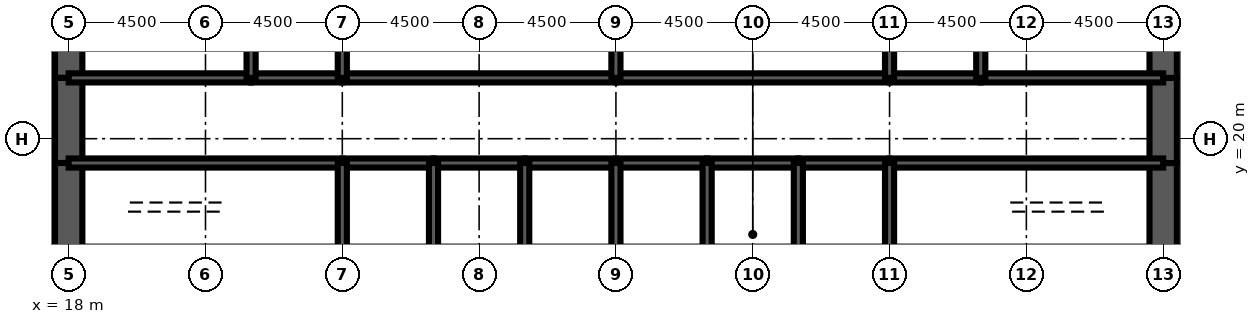
"""IFC4 building model, lengths in metres.
Left out: names, types, materials, properties, quantities, classifications, styles, units other than length and angle.
Written with IfcOpenShell. Run it as: python <this file> out.ifc"""

import sys

from ifc_helpers import new_model, si_unit, direction, frame, frame_2d, origin, place, context, subcontext, project, spatial, rectangle, extrude, element, fill, save


model = new_model("IFC4")
c1 = context("Model", 3, precision=1e-05, world=origin(), true_north=direction((0.0, 1.0)))
c2 = subcontext(c1, "Body", "Model", "MODEL_VIEW")
j1 = project(units=[si_unit("LENGTHUNIT", "METRE"), si_unit("PLANEANGLEUNIT", "RADIAN")], contexts=[c1])
p1 = place(None, origin())
s1 = spatial("IfcSite", under=j1, at=p1, CompositionType="ELEMENT")
p2 = place(p1, origin())
s2 = spatial("IfcBuilding", under=s1, at=p2, CompositionType="ELEMENT")
p3 = place(p2, frame((0.0, 0.0, 142.5)))
s3 = spatial("IfcBuildingStorey", under=s2, at=p3, CompositionType="ELEMENT", Elevation=142.5)
p4 = place(p3, frame((18.0, 26.0, 0.0), z_axis=(0.0, 0.0, 1.0), x_axis=(0.0, -1.0, 0.0)))
e1 = element("IfcWall", 1, at=p4, inside=s3, PredefinedType="SHEAR", context=c2, shape_type="SweptSolid", body=[
    extrude(rectangle(XDim=4.0, YDim=0.9, at=frame_2d((2.0, 0.0))), origin(), (0.0, 0.0, 1.0), 4.2),
])
p5 = place(p3, frame((18.0, 22.0, 0.0), z_axis=(0.0, 0.0, 1.0), x_axis=(0.0, -1.0, 0.0)))
e2 = element("IfcWall", 2, at=p5, inside=s3, PredefinedType="SHEAR", context=c2, shape_type="SweptSolid", body=[
    extrude(rectangle(XDim=2.8, YDim=0.9, at=frame_2d((1.4, 0.0))), origin(), (0.0, 0.0, 1.0), 4.2),
])
p6 = place(p5, frame((0.6, 0.0, 0.0)))
e3 = element("IfcOpeningElement", 3, at=p6, cuts=e2, PredefinedType="OPENING", context=c2, shape_type="SweptSolid", body=[
    extrude(rectangle(XDim=1.8, YDim=2.1, at=frame_2d((0.9, 1.05))), frame((0.0, 0.46, 0.0), z_axis=(0.0, -1.0, 0.0), x_axis=(1.0, 0.0, 0.0)), (0.0, 0.0, 1.0), 0.92),
])
for number, where, z_axis, x_axis in (
    (4, (18.0, 19.2, 0.0), (0.0, 0.0, 1.0), (0.0, -1.0, 0.0)),
    (5, (54.0, 16.0, 0.0), (0.0, 0.0, 1.0), (0.0, 1.0, 0.0)),
):
    element("IfcWall", number, at=place(p3, frame(where, z_axis=z_axis, x_axis=x_axis)), inside=s3, PredefinedType="SHEAR", context=c2, shape_type="SweptSolid", body=[
        extrude(rectangle(XDim=3.2, YDim=0.9, at=frame_2d((1.6, 0.0))), origin(), (0.0, 0.0, 1.0), 4.2),
    ])
p7 = place(p3, frame((54.0, 19.2, 0.0), z_axis=(0.0, 0.0, 1.0), x_axis=(0.0, 1.0, 0.0)))
e6 = element("IfcWall", 6, at=p7, inside=s3, PredefinedType="SHEAR", context=c2, shape_type="SweptSolid", body=[
    extrude(rectangle(XDim=2.8, YDim=0.9, at=frame_2d((1.4, 0.0))), origin(), (0.0, 0.0, 1.0), 4.2),
])
p8 = place(p7, frame((0.4, 0.0, 0.0)))
e7 = element("IfcOpeningElement", 7, at=p8, cuts=e6, PredefinedType="OPENING", context=c2, shape_type="SweptSolid", body=[
    extrude(rectangle(XDim=1.8, YDim=2.1, at=frame_2d((0.9, 1.05))), frame((0.0, 0.46, 0.0), z_axis=(0.0, -1.0, 0.0), x_axis=(1.0, 0.0, 0.0)), (0.0, 0.0, 1.0), 0.92),
])
p9 = place(p3, frame((54.0, 22.0, 0.0), z_axis=(0.0, 0.0, 1.0), x_axis=(0.0, 1.0, 0.0)))
e8 = element("IfcWall", 8, at=p9, inside=s3, PredefinedType="SHEAR", context=c2, shape_type="SweptSolid", body=[
    extrude(rectangle(XDim=4.0, YDim=0.9, at=frame_2d((2.0, 0.0))), origin(), (0.0, 0.0, 1.0), 4.2),
])
p10 = place(p3, frame((18.0, 19.2, 0.0), z_axis=(0.0, 0.0, 1.0), x_axis=(1.0, 0.0, 0.0)))
e9 = element("IfcWall", 9, at=p10, inside=s3, PredefinedType="SOLIDWALL", context=c2, shape_type="SweptSolid", body=[
    extrude(rectangle(XDim=9.0, YDim=0.3, at=frame_2d((4.5, 0.0))), origin(), (0.0, 0.0, 1.0), 4.2),
])
p11 = place(p10, frame((0.65, 0.0, 0.0)))
e10 = element("IfcOpeningElement", 10, at=p11, cuts=e9, PredefinedType="OPENING", context=c2, shape_type="SweptSolid", body=[
    extrude(rectangle(XDim=1.0, YDim=2.1, at=frame_2d((0.5, 1.05))), frame((0.0, 0.16, 0.0), z_axis=(0.0, -1.0, 0.0), x_axis=(1.0, 0.0, 0.0)), (0.0, 0.0, 1.0), 0.32),
])
p12 = place(p3, frame((27.0, 19.2, 0.0), z_axis=(0.0, 0.0, 1.0), x_axis=(1.0, 0.0, 0.0)))
e11 = element("IfcWall", 11, at=p12, inside=s3, PredefinedType="SOLIDWALL", context=c2, shape_type="SweptSolid", body=[
    extrude(rectangle(XDim=3.0, YDim=0.3, at=frame_2d((1.5, 0.0))), origin(), (0.0, 0.0, 1.0), 4.2),
])
p13 = place(p12, frame((0.95, 0.0, 0.0)))
e12 = element("IfcOpeningElement", 12, at=p13, cuts=e11, PredefinedType="OPENING", context=c2, shape_type="SweptSolid", body=[
    extrude(rectangle(XDim=1.1, YDim=2.2, at=frame_2d((0.55, 1.1))), frame((0.0, 0.16, 0.0), z_axis=(0.0, -1.0, 0.0), x_axis=(1.0, 0.0, 0.0)), (0.0, 0.0, 1.0), 0.32),
])
p14 = place(p3, frame((30.0, 19.2, 0.0), z_axis=(0.0, 0.0, 1.0), x_axis=(1.0, 0.0, 0.0)))
e13 = element("IfcWall", 13, at=p14, inside=s3, PredefinedType="SOLIDWALL", context=c2, shape_type="SweptSolid", body=[
    extrude(rectangle(XDim=3.0, YDim=0.3, at=frame_2d((1.5, 0.0))), origin(), (0.0, 0.0, 1.0), 4.2),
])
p15 = place(p14, frame((0.95, 0.0, 0.0)))
e14 = element("IfcOpeningElement", 14, at=p15, cuts=e13, PredefinedType="OPENING", context=c2, shape_type="SweptSolid", body=[
    extrude(rectangle(XDim=1.1, YDim=2.2, at=frame_2d((0.55, 1.1))), frame((0.0, 0.16, 0.0), z_axis=(0.0, -1.0, 0.0), x_axis=(1.0, 0.0, 0.0)), (0.0, 0.0, 1.0), 0.32),
])
p16 = place(p3, frame((33.0, 19.2, 0.0), z_axis=(0.0, 0.0, 1.0), x_axis=(1.0, 0.0, 0.0)))
e15 = element("IfcWall", 15, at=p16, inside=s3, PredefinedType="SOLIDWALL", context=c2, shape_type="SweptSolid", body=[
    extrude(rectangle(XDim=3.0, YDim=0.3, at=frame_2d((1.5, 0.0))), origin(), (0.0, 0.0, 1.0), 4.2),
])
p17 = place(p16, frame((0.95, 0.0, 0.0)))
e16 = element("IfcOpeningElement", 16, at=p17, cuts=e15, PredefinedType="OPENING", context=c2, shape_type="SweptSolid", body=[
    extrude(rectangle(XDim=1.1, YDim=2.2, at=frame_2d((0.55, 1.1))), frame((0.0, 0.16, 0.0), z_axis=(0.0, -1.0, 0.0), x_axis=(1.0, 0.0, 0.0)), (0.0, 0.0, 1.0), 0.32),
])
p18 = place(p3, frame((36.0, 19.2, 0.0), z_axis=(0.0, 0.0, 1.0), x_axis=(1.0, 0.0, 0.0)))
e17 = element("IfcWall", 17, at=p18, inside=s3, PredefinedType="SOLIDWALL", context=c2, shape_type="SweptSolid", body=[
    extrude(rectangle(XDim=3.0, YDim=0.3, at=frame_2d((1.5, 0.0))), origin(), (0.0, 0.0, 1.0), 4.2),
])
p19 = place(p18, frame((0.95, 0.0, 0.0)))
e18 = element("IfcOpeningElement", 18, at=p19, cuts=e17, PredefinedType="OPENING", context=c2, shape_type="SweptSolid", body=[
    extrude(rectangle(XDim=1.1, YDim=2.2, at=frame_2d((0.55, 1.1))), frame((0.0, 0.16, 0.0), z_axis=(0.0, -1.0, 0.0), x_axis=(1.0, 0.0, 0.0)), (0.0, 0.0, 1.0), 0.32),
])
p20 = place(p3, frame((39.0, 19.2, 0.0), z_axis=(0.0, 0.0, 1.0), x_axis=(1.0, 0.0, 0.0)))
e19 = element("IfcWall", 19, at=p20, inside=s3, PredefinedType="SOLIDWALL", context=c2, shape_type="SweptSolid", body=[
    extrude(rectangle(XDim=3.0, YDim=0.3, at=frame_2d((1.5, 0.0))), origin(), (0.0, 0.0, 1.0), 4.2),
])
p21 = place(p20, frame((1.0, 0.0, 0.0)))
e20 = element("IfcOpeningElement", 20, at=p21, cuts=e19, PredefinedType="OPENING", context=c2, shape_type="SweptSolid", body=[
    extrude(rectangle(XDim=1.0, YDim=2.1, at=frame_2d((0.5, 1.05))), frame((0.0, 0.16, 0.0), z_axis=(0.0, -1.0, 0.0), x_axis=(1.0, 0.0, 0.0)), (0.0, 0.0, 1.0), 0.32),
])
p22 = place(p3, frame((42.0, 19.2, 0.0), z_axis=(0.0, 0.0, 1.0), x_axis=(1.0, 0.0, 0.0)))
e21 = element("IfcWall", 21, at=p22, inside=s3, PredefinedType="SOLIDWALL", context=c2, shape_type="SweptSolid", body=[
    extrude(rectangle(XDim=3.0, YDim=0.3, at=frame_2d((1.5, 0.0))), origin(), (0.0, 0.0, 1.0), 4.2),
])
p23 = place(p3, frame((45.0, 19.2, 0.0), z_axis=(0.0, 0.0, 1.0), x_axis=(1.0, 0.0, 0.0)))
e22 = element("IfcWall", 22, at=p23, inside=s3, PredefinedType="SOLIDWALL", context=c2, shape_type="SweptSolid", body=[
    extrude(rectangle(XDim=9.0, YDim=0.3, at=frame_2d((4.5, 0.0))), origin(), (0.0, 0.0, 1.0), 4.2),
])
p24 = place(p23, frame((7.35, 0.0, 0.0)))
e23 = element("IfcOpeningElement", 23, at=p24, cuts=e22, PredefinedType="OPENING", context=c2, shape_type="SweptSolid", body=[
    extrude(rectangle(XDim=1.0, YDim=2.1, at=frame_2d((0.5, 1.05))), frame((0.0, 0.16, 0.0), z_axis=(0.0, -1.0, 0.0), x_axis=(1.0, 0.0, 0.0)), (0.0, 0.0, 1.0), 0.32),
])
p25 = place(p3, frame((18.0, 22.0, 0.0), z_axis=(0.0, 0.0, 1.0), x_axis=(1.0, 0.0, 0.0)))
e24 = element("IfcWall", 24, at=p25, inside=s3, PredefinedType="SOLIDWALL", context=c2, shape_type="SweptSolid", body=[
    extrude(rectangle(XDim=6.0, YDim=0.3, at=frame_2d((3.0, 0.0))), origin(), (0.0, 0.0, 1.0), 4.2),
])
p26 = place(p25, frame((2.0, 0.0, 0.0)))
e25 = element("IfcOpeningElement", 25, at=p26, cuts=e24, PredefinedType="OPENING", context=c2, shape_type="SweptSolid", body=[
    extrude(rectangle(XDim=1.0, YDim=2.1, at=frame_2d((0.5, 1.05))), frame((0.0, 0.16, 0.0), z_axis=(0.0, -1.0, 0.0), x_axis=(1.0, 0.0, 0.0)), (0.0, 0.0, 1.0), 0.32),
])
p27 = place(p3, frame((24.0, 22.0, 0.0), z_axis=(0.0, 0.0, 1.0), x_axis=(1.0, 0.0, 0.0)))
e26 = element("IfcWall", 26, at=p27, inside=s3, PredefinedType="SOLIDWALL", context=c2, shape_type="SweptSolid", body=[
    extrude(rectangle(XDim=3.0, YDim=0.3, at=frame_2d((1.5, 0.0))), origin(), (0.0, 0.0, 1.0), 4.2),
])
p28 = place(p27, frame((1.0, 0.0, 0.0)))
e27 = element("IfcOpeningElement", 27, at=p28, cuts=e26, PredefinedType="OPENING", context=c2, shape_type="SweptSolid", body=[
    extrude(rectangle(XDim=1.0, YDim=2.1, at=frame_2d((0.5, 1.05))), frame((0.0, 0.16, 0.0), z_axis=(0.0, -1.0, 0.0), x_axis=(1.0, 0.0, 0.0)), (0.0, 0.0, 1.0), 0.32),
])
p29 = place(p3, frame((27.0, 22.0, 0.0), z_axis=(0.0, 0.0, 1.0), x_axis=(1.0, 0.0, 0.0)))
e28 = element("IfcWall", 28, at=p29, inside=s3, PredefinedType="SOLIDWALL", context=c2, shape_type="SweptSolid", body=[
    extrude(rectangle(XDim=9.0, YDim=0.3, at=frame_2d((4.5, 0.0))), origin(), (0.0, 0.0, 1.0), 4.2),
])
p30 = place(p29, frame((4.0, 0.0, 0.0)))
e29 = element("IfcOpeningElement", 29, at=p30, cuts=e28, PredefinedType="OPENING", context=c2, shape_type="SweptSolid", body=[
    extrude(rectangle(XDim=1.0, YDim=2.1, at=frame_2d((0.5, 1.05))), frame((0.0, 0.16, 0.0), z_axis=(0.0, -1.0, 0.0), x_axis=(1.0, 0.0, 0.0)), (0.0, 0.0, 1.0), 0.32),
])
p31 = place(p3, frame((36.0, 22.0, 0.0), z_axis=(0.0, 0.0, 1.0), x_axis=(1.0, 0.0, 0.0)))
e30 = element("IfcWall", 30, at=p31, inside=s3, PredefinedType="SOLIDWALL", context=c2, shape_type="SweptSolid", body=[
    extrude(rectangle(XDim=9.0, YDim=0.3, at=frame_2d((4.5, 0.0))), origin(), (0.0, 0.0, 1.0), 4.2),
])
p32 = place(p31, frame((4.0, 0.0, 0.0)))
e31 = element("IfcOpeningElement", 31, at=p32, cuts=e30, PredefinedType="OPENING", context=c2, shape_type="SweptSolid", body=[
    extrude(rectangle(XDim=1.0, YDim=2.1, at=frame_2d((0.5, 1.05))), frame((0.0, 0.16, 0.0), z_axis=(0.0, -1.0, 0.0), x_axis=(1.0, 0.0, 0.0)), (0.0, 0.0, 1.0), 0.32),
])
p33 = place(p3, frame((45.0, 22.0, 0.0), z_axis=(0.0, 0.0, 1.0), x_axis=(1.0, 0.0, 0.0)))
e32 = element("IfcWall", 32, at=p33, inside=s3, PredefinedType="SOLIDWALL", context=c2, shape_type="SweptSolid", body=[
    extrude(rectangle(XDim=3.0, YDim=0.3, at=frame_2d((1.5, 0.0))), origin(), (0.0, 0.0, 1.0), 4.2),
])
p34 = place(p33, frame((1.0, 0.0, 0.0)))
e33 = element("IfcOpeningElement", 33, at=p34, cuts=e32, PredefinedType="OPENING", context=c2, shape_type="SweptSolid", body=[
    extrude(rectangle(XDim=1.0, YDim=2.1, at=frame_2d((0.5, 1.05))), frame((0.0, 0.16, 0.0), z_axis=(0.0, -1.0, 0.0), x_axis=(1.0, 0.0, 0.0)), (0.0, 0.0, 1.0), 0.32),
])
p35 = place(p3, frame((48.0, 22.0, 0.0), z_axis=(0.0, 0.0, 1.0), x_axis=(1.0, 0.0, 0.0)))
e34 = element("IfcWall", 34, at=p35, inside=s3, PredefinedType="SOLIDWALL", context=c2, shape_type="SweptSolid", body=[
    extrude(rectangle(XDim=6.0, YDim=0.3, at=frame_2d((3.0, 0.0))), origin(), (0.0, 0.0, 1.0), 4.2),
])
p36 = place(p35, frame((2.0, 0.0, 0.0)))
e35 = element("IfcOpeningElement", 35, at=p36, cuts=e34, PredefinedType="OPENING", context=c2, shape_type="SweptSolid", body=[
    extrude(rectangle(XDim=1.0, YDim=2.1, at=frame_2d((0.5, 1.05))), frame((0.0, 0.16, 0.0), z_axis=(0.0, -1.0, 0.0), x_axis=(1.0, 0.0, 0.0)), (0.0, 0.0, 1.0), 0.32),
])
p37 = place(p35, frame((4.3, 0.0, 0.0)))
e36 = element("IfcOpeningElement", 36, at=p37, cuts=e34, PredefinedType="OPENING", context=c2, shape_type="SweptSolid", body=[
    extrude(rectangle(XDim=1.0, YDim=2.1, at=frame_2d((0.5, 1.05))), frame((0.0, 0.16, 0.0), z_axis=(0.0, -1.0, 0.0), x_axis=(1.0, 0.0, 0.0)), (0.0, 0.0, 1.0), 0.32),
])
for number, where, z_axis, x_axis in (
    (37, (27.0, 16.0, 0.0), (0.0, 0.0, 1.0), (0.0, 1.0, 0.0)),
    (38, (30.0, 16.0, 0.0), (0.0, 0.0, 1.0), (0.0, 1.0, 0.0)),
    (39, (33.0, 16.0, 0.0), (0.0, 0.0, 1.0), (0.0, 1.0, 0.0)),
    (40, (36.0, 16.0, 0.0), (0.0, 0.0, 1.0), (0.0, 1.0, 0.0)),
    (41, (39.0, 16.0, 0.0), (0.0, 0.0, 1.0), (0.0, 1.0, 0.0)),
    (42, (42.0, 16.0, 0.0), (0.0, 0.0, 1.0), (0.0, 1.0, 0.0)),
    (43, (45.0, 16.0, 0.0), (0.0, 0.0, 1.0), (0.0, 1.0, 0.0)),
):
    element("IfcWall", number, at=place(p3, frame(where, z_axis=z_axis, x_axis=x_axis)), inside=s3, PredefinedType="SOLIDWALL", context=c2, shape_type="SweptSolid", body=[
        extrude(rectangle(XDim=3.2, YDim=0.3, at=frame_2d((1.6, 0.0))), origin(), (0.0, 0.0, 1.0), 4.2),
    ])
for number, where, z_axis, x_axis in (
    (44, (24.0, 22.0, 0.0), (0.0, 0.0, 1.0), (0.0, 1.0, 0.0)),
    (45, (27.0, 22.0, 0.0), (0.0, 0.0, 1.0), (0.0, 1.0, 0.0)),
    (46, (36.0, 22.0, 0.0), (0.0, 0.0, 1.0), (0.0, 1.0, 0.0)),
    (47, (45.0, 22.0, 0.0), (0.0, 0.0, 1.0), (0.0, 1.0, 0.0)),
    (48, (48.0, 22.0, 0.0), (0.0, 0.0, 1.0), (0.0, 1.0, 0.0)),
):
    element("IfcWall", number, at=place(p3, frame(where, z_axis=z_axis, x_axis=x_axis)), inside=s3, PredefinedType="SOLIDWALL", context=c2, shape_type="SweptSolid", body=[
        extrude(rectangle(XDim=4.0, YDim=0.3, at=frame_2d((2.0, 0.0))), origin(), (0.0, 0.0, 1.0), 4.2),
    ])
p38 = place(p3, frame((39.15, 17.4, 0.0), z_axis=(0.0, 0.0, 1.0), x_axis=(1.0, 0.0, 0.0)))
e49 = element("IfcWall", 49, at=p38, inside=s3, PredefinedType="SOLIDWALL", context=c2, shape_type="SweptSolid", body=[
    extrude(rectangle(XDim=2.7, YDim=0.3, at=frame_2d((1.35, 0.0))), origin(), (0.0, 0.0, 1.0), 4.04),
])
p39 = place(p38, frame((0.85, 0.0, 0.0)))
e50 = element("IfcOpeningElement", 50, at=p39, cuts=e49, PredefinedType="OPENING", context=c2, shape_type="SweptSolid", body=[
    extrude(rectangle(XDim=1.0, YDim=2.1, at=frame_2d((0.5, 1.05))), frame((0.0, 0.16, 0.0), z_axis=(0.0, -1.0, 0.0), x_axis=(1.0, 0.0, 0.0)), (0.0, 0.0, 1.0), 0.32),
])
p40 = place(p3, frame((38.5, 22.15, 0.0), z_axis=(0.0, 0.0, 1.0), x_axis=(0.0, 1.0, 0.0)))
e51 = element("IfcWall", 51, at=p40, inside=s3, PredefinedType="PARTITIONING", context=c2, shape_type="SweptSolid", body=[
    extrude(rectangle(XDim=3.7, YDim=0.15, at=frame_2d((1.85, 0.0))), origin(), (0.0, 0.0, 1.0), 3.0),
])
p41 = place(p40, frame((2.2, 0.0, 0.0)))
e52 = element("IfcOpeningElement", 52, at=p41, cuts=e51, PredefinedType="OPENING", context=c2, shape_type="SweptSolid", body=[
    extrude(rectangle(XDim=1.0, YDim=2.1, at=frame_2d((0.5, 1.05))), frame((0.0, 0.085, 0.0), z_axis=(0.0, -1.0, 0.0), x_axis=(1.0, 0.0, 0.0)), (0.0, 0.0, 1.0), 0.17),
])
p42 = place(p3, frame((51.975, 22.15, 0.0), z_axis=(0.0, 0.0, 1.0), x_axis=(0.0, 1.0, 0.0)))
e53 = element("IfcWall", 53, at=p42, inside=s3, PredefinedType="PARTITIONING", context=c2, shape_type="SweptSolid", body=[
    extrude(rectangle(XDim=3.7, YDim=0.15, at=frame_2d((1.85, 0.0))), origin(), (0.0, 0.0, 1.0), 3.0),
])
p43 = place(p39, origin())
e54 = element("IfcDoor", 54, at=p43, inside=s3, OperationType="SINGLE_SWING_LEFT", PredefinedType="DOOR", context=c2, shape_type="SweptSolid", body=[
    extrude(rectangle(XDim=1.0, YDim=2.1, at=frame_2d((0.5, 1.05))), frame((0.0, 0.025, 0.0), z_axis=(0.0, -1.0, 0.0), x_axis=(1.0, 0.0, 0.0)), (0.0, 0.0, 1.0), 0.05),
])
fill(e50, e54)
p44 = place(p13, origin())
e55 = element("IfcDoor", 55, at=p44, inside=s3, OperationType="DOUBLE_DOOR_SLIDING", PredefinedType="USERDEFINED", context=c2, shape_type="SweptSolid", body=[
    extrude(rectangle(XDim=1.1, YDim=2.2, at=frame_2d((0.55, 1.1))), frame((0.0, 0.025, 0.0), z_axis=(0.0, -1.0, 0.0), x_axis=(1.0, 0.0, 0.0)), (0.0, 0.0, 1.0), 0.05),
])
fill(e12, e55)
p45 = place(p15, origin())
e56 = element("IfcDoor", 56, at=p45, inside=s3, OperationType="DOUBLE_DOOR_SLIDING", PredefinedType="USERDEFINED", context=c2, shape_type="SweptSolid", body=[
    extrude(rectangle(XDim=1.1, YDim=2.2, at=frame_2d((0.55, 1.1))), frame((0.0, 0.025, 0.0), z_axis=(0.0, -1.0, 0.0), x_axis=(1.0, 0.0, 0.0)), (0.0, 0.0, 1.0), 0.05),
])
fill(e14, e56)
p46 = place(p17, origin())
e57 = element("IfcDoor", 57, at=p46, inside=s3, OperationType="DOUBLE_DOOR_SLIDING", PredefinedType="USERDEFINED", context=c2, shape_type="SweptSolid", body=[
    extrude(rectangle(XDim=1.1, YDim=2.2, at=frame_2d((0.55, 1.1))), frame((0.0, 0.025, 0.0), z_axis=(0.0, -1.0, 0.0), x_axis=(1.0, 0.0, 0.0)), (0.0, 0.0, 1.0), 0.05),
])
fill(e16, e57)
p47 = place(p19, origin())
e58 = element("IfcDoor", 58, at=p47, inside=s3, OperationType="DOUBLE_DOOR_SLIDING", PredefinedType="USERDEFINED", context=c2, shape_type="SweptSolid", body=[
    extrude(rectangle(XDim=1.1, YDim=2.2, at=frame_2d((0.55, 1.1))), frame((0.0, 0.025, 0.0), z_axis=(0.0, -1.0, 0.0), x_axis=(1.0, 0.0, 0.0)), (0.0, 0.0, 1.0), 0.05),
])
fill(e18, e58)
p48 = place(p11, origin())
e59 = element("IfcDoor", 59, at=p48, inside=s3, OperationType="SINGLE_SWING_LEFT", PredefinedType="DOOR", context=c2, shape_type="SweptSolid", body=[
    extrude(rectangle(XDim=1.0, YDim=2.1, at=frame_2d((0.5, 1.05))), frame((0.0, 0.025, 0.0), z_axis=(0.0, -1.0, 0.0), x_axis=(1.0, 0.0, 0.0)), (0.0, 0.0, 1.0), 0.05),
])
fill(e10, e59)
p49 = place(p24, origin())
e60 = element("IfcDoor", 60, at=p49, inside=s3, OperationType="SINGLE_SWING_RIGHT", PredefinedType="DOOR", context=c2, shape_type="SweptSolid", body=[
    extrude(rectangle(XDim=1.0, YDim=2.1, at=frame_2d((0.5, 1.05))), frame((0.0, 0.025, 0.0), z_axis=(0.0, -1.0, 0.0), x_axis=(1.0, 0.0, 0.0)), (0.0, 0.0, 1.0), 0.05),
])
fill(e23, e60)
p50 = place(p6, origin())
e61 = element("IfcDoor", 61, at=p50, inside=s3, OperationType="SINGLE_SWING_LEFT", PredefinedType="DOOR", context=c2, shape_type="SweptSolid", body=[
    extrude(rectangle(XDim=1.8, YDim=2.1, at=frame_2d((0.9, 1.05))), frame((0.0, 0.45, 0.0), z_axis=(0.0, -1.0, 0.0), x_axis=(1.0, 0.0, 0.0)), (0.0, 0.0, 1.0), 0.899),
])
fill(e3, e61)
p51 = place(p8, origin())
e62 = element("IfcDoor", 62, at=p51, inside=s3, OperationType="SINGLE_SWING_LEFT", PredefinedType="DOOR", context=c2, shape_type="SweptSolid", body=[
    extrude(rectangle(XDim=1.8, YDim=2.1, at=frame_2d((0.9, 1.05))), frame((0.0, 0.45, 0.0), z_axis=(0.0, -1.0, 0.0), x_axis=(1.0, 0.0, 0.0)), (0.0, 0.0, 1.0), 0.899),
])
fill(e7, e62)
p52 = place(p26, origin())
e63 = element("IfcDoor", 63, at=p52, inside=s3, OperationType="SINGLE_SWING_LEFT", PredefinedType="DOOR", context=c2, shape_type="SweptSolid", body=[
    extrude(rectangle(XDim=1.0, YDim=2.1, at=frame_2d((0.5, 1.05))), frame((0.0, 0.025, 0.0), z_axis=(0.0, -1.0, 0.0), x_axis=(1.0, 0.0, 0.0)), (0.0, 0.0, 1.0), 0.05),
])
fill(e25, e63)
p53 = place(p28, origin())
e64 = element("IfcDoor", 64, at=p53, inside=s3, OperationType="SINGLE_SWING_LEFT", PredefinedType="DOOR", context=c2, shape_type="SweptSolid", body=[
    extrude(rectangle(XDim=1.0, YDim=2.1, at=frame_2d((0.5, 1.05))), frame((0.0, 0.025, 0.0), z_axis=(0.0, -1.0, 0.0), x_axis=(1.0, 0.0, 0.0)), (0.0, 0.0, 1.0), 0.05),
])
fill(e27, e64)
p54 = place(p30, origin())
e65 = element("IfcDoor", 65, at=p54, inside=s3, OperationType="SINGLE_SWING_LEFT", PredefinedType="DOOR", context=c2, shape_type="SweptSolid", body=[
    extrude(rectangle(XDim=1.0, YDim=2.1, at=frame_2d((0.5, 1.05))), frame((0.0, 0.025, 0.0), z_axis=(0.0, -1.0, 0.0), x_axis=(1.0, 0.0, 0.0)), (0.0, 0.0, 1.0), 0.05),
])
fill(e29, e65)
p55 = place(p32, origin())
e66 = element("IfcDoor", 66, at=p55, inside=s3, OperationType="SINGLE_SWING_LEFT", PredefinedType="DOOR", context=c2, shape_type="SweptSolid", body=[
    extrude(rectangle(XDim=1.0, YDim=2.1, at=frame_2d((0.5, 1.05))), frame((0.0, 0.025, 0.0), z_axis=(0.0, -1.0, 0.0), x_axis=(1.0, 0.0, 0.0)), (0.0, 0.0, 1.0), 0.05),
])
fill(e31, e66)
p56 = place(p34, origin())
e67 = element("IfcDoor", 67, at=p56, inside=s3, OperationType="SINGLE_SWING_LEFT", PredefinedType="DOOR", context=c2, shape_type="SweptSolid", body=[
    extrude(rectangle(XDim=1.0, YDim=2.1, at=frame_2d((0.5, 1.05))), frame((0.0, 0.025, 0.0), z_axis=(0.0, -1.0, 0.0), x_axis=(1.0, 0.0, 0.0)), (0.0, 0.0, 1.0), 0.05),
])
fill(e33, e67)
p57 = place(p36, origin())
e68 = element("IfcDoor", 68, at=p57, inside=s3, OperationType="SINGLE_SWING_LEFT", PredefinedType="DOOR", context=c2, shape_type="SweptSolid", body=[
    extrude(rectangle(XDim=1.0, YDim=2.1, at=frame_2d((0.5, 1.05))), frame((0.0, 0.025, 0.0), z_axis=(0.0, -1.0, 0.0), x_axis=(1.0, 0.0, 0.0)), (0.0, 0.0, 1.0), 0.05),
])
fill(e35, e68)
p58 = place(p37, origin())
e69 = element("IfcDoor", 69, at=p58, inside=s3, OperationType="SINGLE_SWING_RIGHT", PredefinedType="DOOR", context=c2, shape_type="SweptSolid", body=[
    extrude(rectangle(XDim=1.0, YDim=2.1, at=frame_2d((0.5, 1.05))), frame((0.0, 0.025, 0.0), z_axis=(0.0, -1.0, 0.0), x_axis=(1.0, 0.0, 0.0)), (0.0, 0.0, 1.0), 0.05),
])
fill(e36, e69)
p59 = place(p21, origin())
e70 = element("IfcDoor", 70, at=p59, inside=s3, OperationType="SINGLE_SWING_LEFT", PredefinedType="DOOR", context=c2, shape_type="SweptSolid", body=[
    extrude(rectangle(XDim=1.0, YDim=2.1, at=frame_2d((0.5, 1.05))), frame((0.0, 0.025, 0.0), z_axis=(0.0, -1.0, 0.0), x_axis=(1.0, 0.0, 0.0)), (0.0, 0.0, 1.0), 0.05),
])
fill(e20, e70)
save(model, sys.argv[1])
